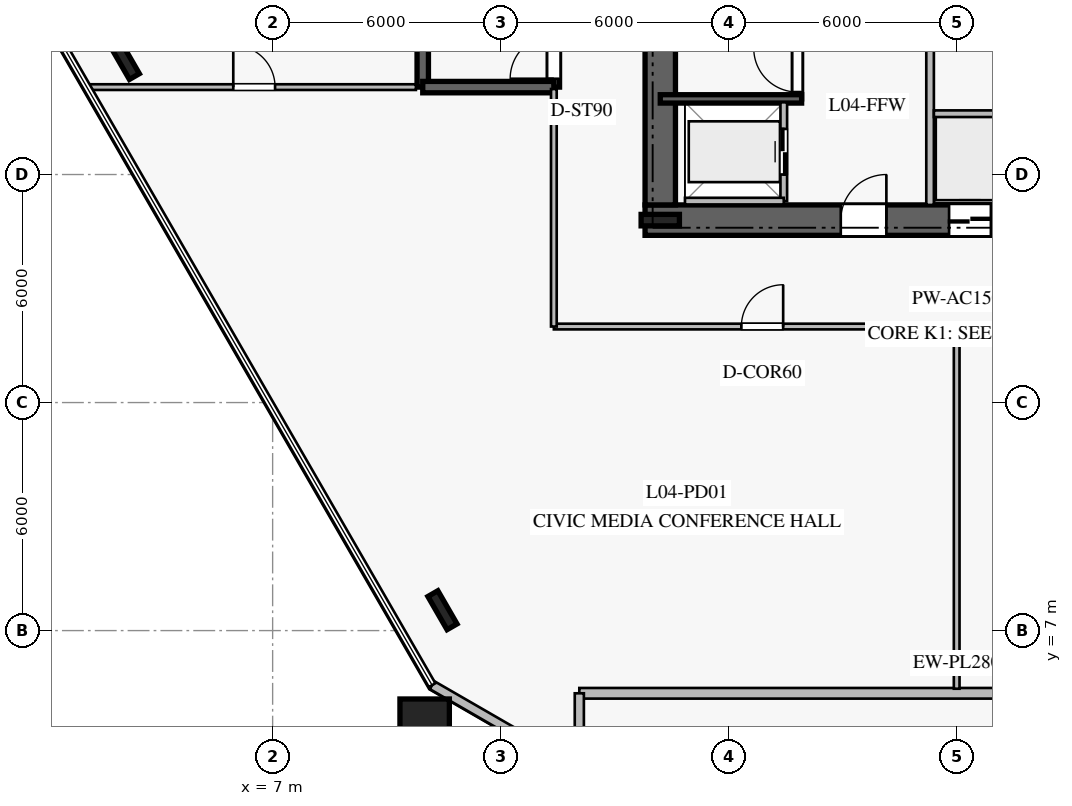
"""IFC4 building model, lengths in metres.
Left out: names, types, materials, properties, quantities, classifications, styles, units other than length and angle.
Written with IfcOpenShell. Run it as: python <this file> out.ifc"""

import sys

from ifc_helpers import new_model, si_unit, direction, frame, frame_2d, origin, origin_2d, place, context, subcontext, project, spatial, rectangle, i_section, extrude, element, fill, save


model = new_model("IFC4")
c1 = context("Model", 3, precision=1e-05, world=origin(), true_north=direction((0.0, 1.0)))
c2 = subcontext(c1, "Body", "Model", "MODEL_VIEW")
j1 = project(units=[si_unit("LENGTHUNIT", "METRE"), si_unit("PLANEANGLEUNIT", "RADIAN")], contexts=[c1])
p1 = place(None, origin())
s1 = spatial("IfcSite", under=j1, at=p1, CompositionType="ELEMENT")
p2 = place(p1, origin())
s2 = spatial("IfcBuilding", under=s1, at=p2, CompositionType="ELEMENT")
p3 = place(p2, frame((0.0, 0.0, 19.0)))
s3 = spatial("IfcBuildingStorey", under=s2, at=p3, CompositionType="ELEMENT", Elevation=19.0)
p4 = place(p3, frame((16.8, 17.8, 0.0), z_axis=(0.0, 0.0, 1.0), x_axis=(1.0, 0.0, 0.0)))
e1 = element("IfcWall", 1, at=p4, inside=s3, PredefinedType="SHEAR", context=c2, shape_type="SweptSolid", body=[
    extrude(rectangle(XDim=16.4, YDim=0.8, at=frame_2d((8.2, 0.0))), origin(), (0.0, 0.0, 1.0), 4.76),
])
p5 = place(p4, frame((5.15, 0.0, 0.0)))
e2 = element("IfcOpeningElement", 2, at=p5, cuts=e1, PredefinedType="OPENING", context=c2, shape_type="SweptSolid", body=[
    extrude(rectangle(XDim=1.2, YDim=2.25, at=frame_2d((0.6, 1.125))), frame((0.0, 0.41, 0.0), z_axis=(0.0, -1.0, 0.0), x_axis=(1.0, 0.0, 0.0)), (0.0, 0.0, 1.0), 0.82),
])
p6 = place(p4, frame((14.1, 0.0, 0.0)))
e3 = element("IfcOpeningElement", 3, at=p6, cuts=e1, PredefinedType="OPENING", context=c2, shape_type="SweptSolid", body=[
    extrude(rectangle(XDim=0.9, YDim=2.1, at=frame_2d((0.45, 1.05))), frame((0.0, 0.41, 0.0), z_axis=(0.0, -1.0, 0.0), x_axis=(1.0, 0.0, 0.0)), (0.0, 0.0, 1.0), 0.82),
])
p7 = place(p4, frame((8.0, 0.0, 0.0)))
e4 = element("IfcOpeningElement", 4, at=p7, cuts=e1, PredefinedType="OPENING", context=c2, shape_type="SweptSolid", body=[
    extrude(rectangle(XDim=1.1, YDim=2.2, at=frame_2d((0.55, 1.1))), frame((0.0, 0.41, 0.0), z_axis=(0.0, -1.0, 0.0), x_axis=(1.0, 0.0, 0.0)), (0.0, 0.0, 1.0), 0.82),
])
p8 = place(p4, frame((9.975, 0.0, 0.0)))
e5 = element("IfcOpeningElement", 5, at=p8, cuts=e1, PredefinedType="OPENING", context=c2, shape_type="SweptSolid", body=[
    extrude(rectangle(XDim=1.1, YDim=2.2, at=frame_2d((0.55, 1.1))), frame((0.0, 0.41, 0.0), z_axis=(0.0, -1.0, 0.0), x_axis=(1.0, 0.0, 0.0)), (0.0, 0.0, 1.0), 0.82),
])
p9 = place(p4, frame((11.95, 0.0, 0.0)))
e6 = element("IfcOpeningElement", 6, at=p9, cuts=e1, PredefinedType="OPENING", context=c2, shape_type="SweptSolid", body=[
    extrude(rectangle(XDim=1.1, YDim=2.2, at=frame_2d((0.55, 1.1))), frame((0.0, 0.41, 0.0), z_axis=(0.0, -1.0, 0.0), x_axis=(1.0, 0.0, 0.0)), (0.0, 0.0, 1.0), 0.82),
])
p10 = place(p3, frame((17.2, 31.8, 0.0), z_axis=(0.0, 0.0, 1.0), x_axis=(0.0, -1.0, 0.0)))
e7 = element("IfcWall", 7, at=p10, inside=s3, PredefinedType="SHEAR", context=c2, shape_type="SweptSolid", body=[
    extrude(rectangle(XDim=13.6, YDim=0.8, at=frame_2d((6.8, 0.0))), origin(), (0.0, 0.0, 1.0), 4.76),
])
p11 = place(p10, frame((1.95, 0.0, 0.0)))
e8 = element("IfcOpeningElement", 8, at=p11, cuts=e7, PredefinedType="OPENING", context=c2, shape_type="SweptSolid", body=[
    extrude(rectangle(XDim=1.5, YDim=2.2, at=frame_2d((0.75, 1.1))), frame((0.0, 0.41, 0.0), z_axis=(0.0, -1.0, 0.0), x_axis=(1.0, 0.0, 0.0)), (0.0, 0.0, 1.0), 0.82),
])
p12 = place(p3, frame((17.2, 17.8, 0.0), z_axis=(0.0, 0.0, 1.0), x_axis=(1.0, 0.0, 0.0)))
e9 = element("IfcColumn", 9, at=p12, inside=s3, PredefinedType="COLUMN", context=c2, shape_type="SweptSolid", body=[
    extrude(i_section(OverallWidth=0.302, OverallDepth=1.008, WebThickness=0.021, FlangeThickness=0.04, at=origin_2d()), origin(), (0.0, 0.0, 1.0), 5.0),
])
p13 = place(p3, frame((20.81, 20.99, 0.0), z_axis=(0.0, 0.0, 1.0), x_axis=(0.0, 1.0, 0.0)))
e10 = element("IfcWall", 10, at=p13, inside=s3, PredefinedType="SOLIDWALL", context=c2, shape_type="SweptSolid", body=[
    extrude(rectangle(XDim=7.22, YDim=0.22, at=frame_2d((3.61, 0.0))), origin(), (0.0, 0.0, 1.0), 4.76),
])
p14 = place(p13, frame((0.18, 0.0, 0.0)))
e11 = element("IfcOpeningElement", 11, at=p14, cuts=e10, PredefinedType="OPENING", context=c2, shape_type="SweptSolid", body=[
    extrude(rectangle(XDim=1.15, YDim=2.2, at=frame_2d((0.575, 1.1))), frame((0.0, 0.12, 0.0), z_axis=(0.0, -1.0, 0.0), x_axis=(1.0, 0.0, 0.0)), (0.0, 0.0, 1.0), 0.24),
])
p15 = place(p3, frame((17.2, 20.99, 0.0), z_axis=(0.0, 0.0, 1.0), x_axis=(1.0, 0.0, 0.0)))
e12 = element("IfcWall", 12, at=p15, inside=s3, PredefinedType="SOLIDWALL", context=c2, shape_type="SweptSolid", body=[
    extrude(rectangle(XDim=3.72, YDim=0.22, at=frame_2d((1.86, 0.0))), origin(), (0.0, 0.0, 1.0), 4.76),
])
p16 = place(p3, frame((14.4, 21.3, 0.0), z_axis=(0.0, 0.0, 1.0), x_axis=(0.0, 1.0, 0.0)))
e13 = element("IfcWall", 13, at=p16, inside=s3, PredefinedType="SOLIDWALL", context=c2, shape_type="SweptSolid", body=[
    extrude(rectangle(XDim=7.4, YDim=0.3, at=frame_2d((3.7, 0.0))), origin(), (0.0, 0.0, 1.0), 4.76),
])
p17 = place(p16, frame((0.22, 0.0, 0.0)))
e14 = element("IfcOpeningElement", 14, at=p17, cuts=e13, PredefinedType="OPENING", context=c2, shape_type="SweptSolid", body=[
    extrude(rectangle(XDim=1.15, YDim=2.2, at=frame_2d((0.575, 1.1))), frame((0.0, 0.16, 0.0), z_axis=(0.0, -1.0, 0.0), x_axis=(1.0, 0.0, 0.0)), (0.0, 0.0, 1.0), 0.32),
])
p18 = place(p3, frame((10.95, 21.3, 0.0), z_axis=(0.0, 0.0, 1.0), x_axis=(0.0, 1.0, 0.0)))
e15 = element("IfcWall", 15, at=p18, inside=s3, PredefinedType="SOLIDWALL", context=c2, shape_type="SweptSolid", body=[
    extrude(rectangle(XDim=7.4, YDim=0.3, at=frame_2d((3.7, 0.0))), origin(), (0.0, 0.0, 1.0), 4.76),
])
p19 = place(p3, frame((10.95, 21.3, 0.0), z_axis=(0.0, 0.0, 1.0), x_axis=(1.0, 0.0, 0.0)))
e16 = element("IfcWall", 16, at=p19, inside=s3, PredefinedType="SOLIDWALL", context=c2, shape_type="SweptSolid", body=[
    extrude(rectangle(XDim=3.45, YDim=0.3, at=frame_2d((1.725, 0.0))), origin(), (0.0, 0.0, 1.0), 4.76),
])
for number, where, z_axis, x_axis in (
    (17, (3.11, 22.014, 0.0), (0.0, 0.0, 1.0), (-0.5, 0.866, 0.0)),
    (18, (11.469, 7.536, 0.0), (0.0, 0.0, 1.0), (-0.5, 0.866, 0.0)),
):
    element("IfcColumn", number, at=place(p3, frame(where, z_axis=z_axis, x_axis=x_axis)), inside=s3, PredefinedType="COLUMN", context=c2, shape_type="SweptSolid", body=[
        extrude(i_section(OverallWidth=0.302, OverallDepth=1.008, WebThickness=0.021, FlangeThickness=0.04, at=origin_2d()), origin(), (0.0, 0.0, 1.0), 5.0),
    ])
p20 = place(p3, frame((11.0, 4.55, 0.0), z_axis=(0.0, 0.0, 1.0), x_axis=(1.0, 0.0, 0.0)))
e19 = element("IfcColumn", 19, at=p20, inside=s3, PredefinedType="COLUMN", context=c2, shape_type="SweptSolid", body=[
    extrude(rectangle(XDim=1.3, YDim=1.3, at=origin_2d()), origin(), (0.0, 0.0, 1.0), 5.0),
])
p21 = place(p3, frame((11.196, 5.564, 0.0), z_axis=(0.0, 0.0, 1.0), x_axis=(0.865987450899, -0.500065730564, 0.0)))
e20 = element("IfcWall", 20, at=p21, inside=s3, PredefinedType="STANDARD", context=c2, shape_type="SweptSolid", body=[
    extrude(rectangle(XDim=4.474, YDim=0.24, at=frame_2d((2.237, 0.0))), origin(), (0.0, 0.0, 1.0), 4.76),
])
p22 = place(p3, frame((15.07, 5.35, 0.0), z_axis=(0.0, 0.0, 1.0), x_axis=(1.0, 0.0, 0.0)))
e21 = element("IfcWall", 21, at=p22, inside=s3, PredefinedType="STANDARD", context=c2, shape_type="SweptSolid", body=[
    extrude(rectangle(XDim=19.86, YDim=0.28, at=frame_2d((9.93, 0.0))), origin(), (0.0, 0.0, 1.0), 2.76),
])
p23 = place(p3, frame((15.07, 3.327, 0.0), z_axis=(0.0, 0.0, 1.0), x_axis=(0.0, 1.0, 0.0)))
e22 = element("IfcWall", 22, at=p23, inside=s3, PredefinedType="STANDARD", context=c2, shape_type="SweptSolid", body=[
    extrude(rectangle(XDim=2.023, YDim=0.24, at=frame_2d((1.012, 0.0))), origin(), (0.0, 0.0, 1.0), 4.76),
])
p24 = place(p3, frame((24.3, 18.2, 0.0), z_axis=(0.0, 0.0, 1.0), x_axis=(0.0, 1.0, 0.0)))
e23 = element("IfcWall", 23, at=p24, inside=s3, PredefinedType="PARTITIONING", context=c2, shape_type="SweptSolid", body=[
    extrude(rectangle(XDim=5.15, YDim=0.2, at=frame_2d((2.575, 0.0))), origin(), (0.0, 0.0, 1.0), 4.76),
])
p25 = place(p3, frame((24.4, 20.6, 0.0), z_axis=(0.0, 0.0, 1.0), x_axis=(1.0, 0.0, 0.0)))
e24 = element("IfcWall", 24, at=p25, inside=s3, PredefinedType="PARTITIONING", context=c2, shape_type="SweptSolid", body=[
    extrude(rectangle(XDim=1.9, YDim=0.175, at=frame_2d((0.95, 0.0))), origin(), (0.0, 0.0, 1.0), 4.76),
])
p26 = place(p3, frame((20.45, 18.3, 0.0), z_axis=(0.0, 0.0, 1.0), x_axis=(0.0, 1.0, 0.0)))
e25 = element("IfcWall", 25, at=p26, inside=s3, PredefinedType="PARTITIONING", context=c2, shape_type="SweptSolid", body=[
    extrude(rectangle(XDim=2.6, YDim=0.175, at=frame_2d((1.3, 0.0))), origin(), (0.0, 0.0, 1.0), 4.76),
])
p27 = place(p26, frame((0.7, 0.0, 0.0)))
e26 = element("IfcOpeningElement", 26, at=p27, cuts=e25, PredefinedType="OPENING", context=c2, shape_type="SweptSolid", body=[
    extrude(rectangle(XDim=1.2, YDim=2.2, at=frame_2d((0.6, 1.1))), frame((0.0, 0.098, 0.0), z_axis=(0.0, -1.0, 0.0), x_axis=(1.0, 0.0, 0.0)), (0.0, 0.0, 1.0), 0.195),
])
p28 = place(p3, frame((17.85, 18.3, 0.0), z_axis=(0.0, 0.0, 1.0), x_axis=(1.0, 0.0, 0.0)))
e27 = element("IfcWall", 27, at=p28, inside=s3, PredefinedType="PARTITIONING", context=c2, shape_type="SweptSolid", body=[
    extrude(rectangle(XDim=2.6, YDim=0.175, at=frame_2d((1.3, 0.0))), origin(), (0.0, 0.0, 1.0), 4.76),
])
p29 = place(p3, frame((14.4, 15.0, 0.0), z_axis=(0.0, 0.0, 1.0), x_axis=(1.0, 0.0, 0.0)))
e28 = element("IfcWall", 28, at=p29, inside=s3, PredefinedType="PARTITIONING", context=c2, shape_type="SweptSolid", body=[
    extrude(rectangle(XDim=21.2, YDim=0.15, at=frame_2d((10.6, 0.0))), origin(), (0.0, 0.0, 1.0), 2.76),
])
p30 = place(p29, frame((4.934, 0.0, 0.0)))
e29 = element("IfcOpeningElement", 29, at=p30, cuts=e28, PredefinedType="OPENING", context=c2, shape_type="SweptSolid", body=[
    extrude(rectangle(XDim=1.1, YDim=2.2, at=frame_2d((0.55, 1.1))), frame((0.0, 0.085, 0.0), z_axis=(0.0, -1.0, 0.0), x_axis=(1.0, 0.0, 0.0)), (0.0, 0.0, 1.0), 0.17),
])
p31 = place(p29, frame((15.166, 0.0, 0.0)))
e30 = element("IfcOpeningElement", 30, at=p31, cuts=e28, PredefinedType="OPENING", context=c2, shape_type="SweptSolid", body=[
    extrude(rectangle(XDim=1.1, YDim=2.2, at=frame_2d((0.55, 1.1))), frame((0.0, 0.085, 0.0), z_axis=(0.0, -1.0, 0.0), x_axis=(1.0, 0.0, 0.0)), (0.0, 0.0, 1.0), 0.17),
])
p32 = place(p3, frame((14.4, 15.0, 0.0), z_axis=(0.0, 0.0, 1.0), x_axis=(0.0, 1.0, 0.0)))
e31 = element("IfcWall", 31, at=p32, inside=s3, PredefinedType="PARTITIONING", context=c2, shape_type="SweptSolid", body=[
    extrude(rectangle(XDim=6.25, YDim=0.15, at=frame_2d((3.125, 0.0))), origin(), (0.0, 0.0, 1.0), 2.76),
])
p33 = place(p3, frame((2.08, 21.3, 0.0), z_axis=(0.0, 0.0, 1.0), x_axis=(1.0, 0.0, 0.0)))
e32 = element("IfcWall", 32, at=p33, inside=s3, PredefinedType="PARTITIONING", context=c2, shape_type="SweptSolid", body=[
    extrude(rectangle(XDim=8.69, YDim=0.15, at=frame_2d((4.345, 0.0))), origin(), (0.0, 0.0, 1.0), 2.76),
])
p34 = place(p33, frame((3.884, 0.0, 0.0)))
e33 = element("IfcOpeningElement", 33, at=p34, cuts=e32, PredefinedType="OPENING", context=c2, shape_type="SweptSolid", body=[
    extrude(rectangle(XDim=1.1, YDim=2.2, at=frame_2d((0.55, 1.1))), frame((0.0, 0.085, 0.0), z_axis=(0.0, -1.0, 0.0), x_axis=(1.0, 0.0, 0.0)), (0.0, 0.0, 1.0), 0.17),
])
p35 = place(p3, frame((25.0, 5.47, 0.0), z_axis=(0.0, 0.0, 1.0), x_axis=(0.0, 1.0, 0.0)))
e34 = element("IfcWall", 34, at=p35, inside=s3, PredefinedType="PARTITIONING", context=c2, shape_type="SweptSolid", body=[
    extrude(rectangle(XDim=9.5, YDim=0.15, at=frame_2d((4.75, 0.0))), origin(), (0.0, 0.0, 1.0), 2.76),
])
p36 = place(p14, origin())
e35 = element("IfcDoor", 35, at=p36, inside=s3, OperationType="SINGLE_SWING_RIGHT", PredefinedType="DOOR", context=c2, shape_type="SweptSolid", body=[
    extrude(rectangle(XDim=1.15, YDim=2.2, at=frame_2d((0.575, 1.1))), frame((0.0, 0.025, 0.0), z_axis=(0.0, -1.0, 0.0), x_axis=(1.0, 0.0, 0.0)), (0.0, 0.0, 1.0), 0.05),
])
fill(e11, e35)
p37 = place(p5, origin())
e36 = element("IfcDoor", 36, at=p37, inside=s3, OperationType="SINGLE_SWING_RIGHT", PredefinedType="DOOR", context=c2, shape_type="SweptSolid", body=[
    extrude(rectangle(XDim=1.2, YDim=2.25, at=frame_2d((0.6, 1.125))), frame((0.0, 0.025, 0.0), z_axis=(0.0, -1.0, 0.0), x_axis=(1.0, 0.0, 0.0)), (0.0, 0.0, 1.0), 0.05),
])
fill(e2, e36)
p38 = place(p7, origin())
e37 = element("IfcDoor", 37, at=p38, inside=s3, OperationType="DOUBLE_DOOR_SLIDING", PredefinedType="DOOR", context=c2, shape_type="SweptSolid", body=[
    extrude(rectangle(XDim=1.1, YDim=2.2, at=frame_2d((0.55, 1.1))), frame((0.0, 0.025, 0.0), z_axis=(0.0, -1.0, 0.0), x_axis=(1.0, 0.0, 0.0)), (0.0, 0.0, 1.0), 0.05),
])
fill(e4, e37)
p39 = place(p27, origin())
e38 = element("IfcDoor", 38, at=p39, inside=s3, OperationType="DOUBLE_DOOR_SLIDING", PredefinedType="DOOR", context=c2, shape_type="SweptSolid", body=[
    extrude(rectangle(XDim=1.2, YDim=2.2, at=frame_2d((0.6, 1.1))), frame((0.0, 0.025, 0.0), z_axis=(0.0, -1.0, 0.0), x_axis=(1.0, 0.0, 0.0)), (0.0, 0.0, 1.0), 0.05),
])
fill(e26, e38)
p40 = place(p17, origin())
e39 = element("IfcDoor", 39, at=p40, inside=s3, OperationType="SINGLE_SWING_LEFT", PredefinedType="DOOR", context=c2, shape_type="SweptSolid", body=[
    extrude(rectangle(XDim=1.15, YDim=2.2, at=frame_2d((0.575, 1.1))), frame((0.0, 0.025, 0.0), z_axis=(0.0, -1.0, 0.0), x_axis=(1.0, 0.0, 0.0)), (0.0, 0.0, 1.0), 0.05),
])
fill(e14, e39)
p41 = place(p30, origin())
e40 = element("IfcDoor", 40, at=p41, inside=s3, OperationType="SINGLE_SWING_RIGHT", PredefinedType="DOOR", context=c2, shape_type="SweptSolid", body=[
    extrude(rectangle(XDim=1.1, YDim=2.2, at=frame_2d((0.55, 1.1))), frame((0.0, 0.025, 0.0), z_axis=(0.0, -1.0, 0.0), x_axis=(1.0, 0.0, 0.0)), (0.0, 0.0, 1.0), 0.05),
])
fill(e29, e40)
p42 = place(p34, origin())
e41 = element("IfcDoor", 41, at=p42, inside=s3, OperationType="SINGLE_SWING_LEFT", PredefinedType="DOOR", context=c2, shape_type="SweptSolid", body=[
    extrude(rectangle(XDim=1.1, YDim=2.2, at=frame_2d((0.55, 1.1))), frame((0.0, 0.025, 0.0), z_axis=(0.0, -1.0, 0.0), x_axis=(1.0, 0.0, 0.0)), (0.0, 0.0, 1.0), 0.05),
])
fill(e33, e41)
save(model, sys.argv[1])
